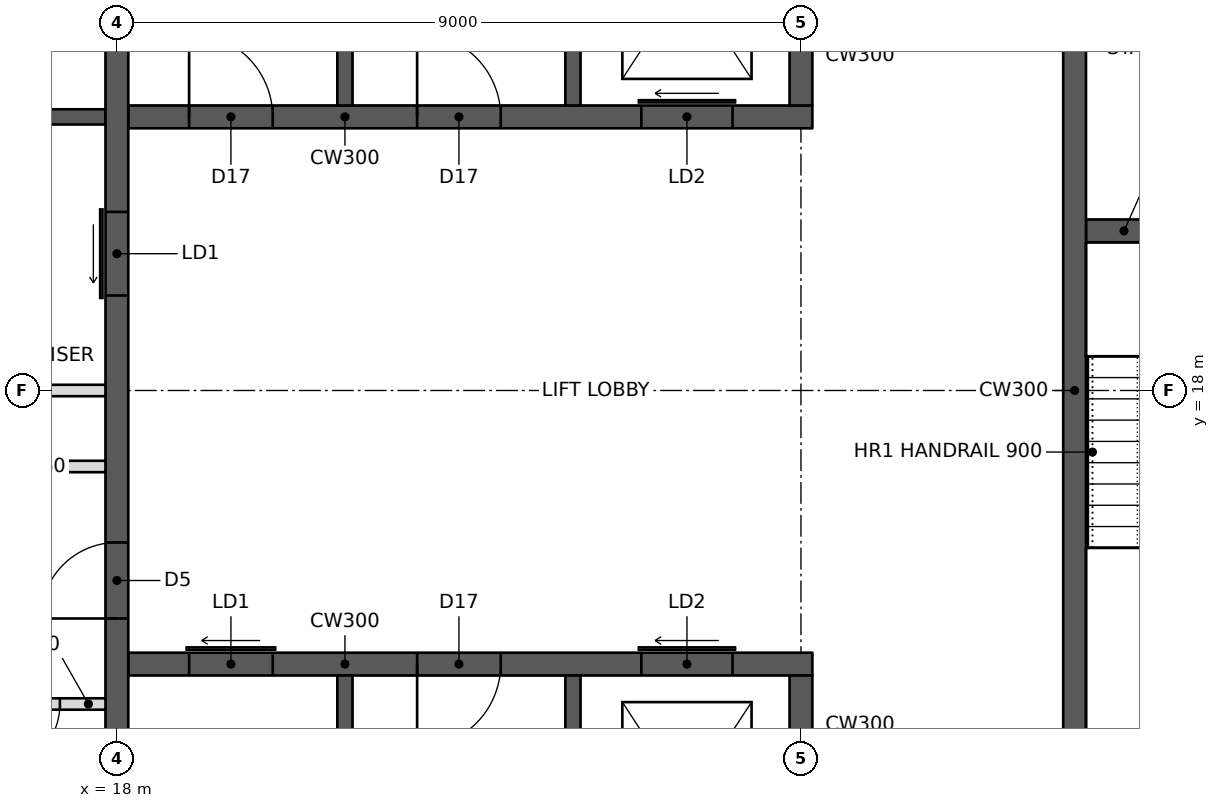
"""IFC4 building model, lengths in metres.
Left out: names, types, materials, properties, quantities, classifications, styles, units other than length and angle.
Written with IfcOpenShell. Run it as: python <this file> out.ifc"""

import sys

from ifc_helpers import new_model, si_unit, direction, frame, frame_2d, origin, place, context, subcontext, project, spatial, rectangle, extrude, element, fill, save


model = new_model("IFC4")
c1 = context("Model", 3, precision=1e-05, world=origin(), true_north=direction((0.0, 1.0)))
c2 = subcontext(c1, "Body", "Model", "MODEL_VIEW")
j1 = project(units=[si_unit("LENGTHUNIT", "METRE"), si_unit("PLANEANGLEUNIT", "RADIAN")], contexts=[c1])
p1 = place(None, origin())
s1 = spatial("IfcSite", under=j1, at=p1, CompositionType="ELEMENT")
p2 = place(p1, origin())
s2 = spatial("IfcBuilding", under=s1, at=p2, CompositionType="ELEMENT")
p3 = place(p2, frame((0.0, 0.0, 204.6)))
s3 = spatial("IfcBuildingStorey", under=s2, at=p3, CompositionType="ELEMENT", Elevation=204.6)
p4 = place(p3, frame((18.0, 11.4, 0.0), z_axis=(0.0, 0.0, 1.0), x_axis=(0.0, 1.0, 0.0)))
e1 = element("IfcWall", 1, at=p4, inside=s3, PredefinedType="SHEAR", context=c2, shape_type="SweptSolid", body=[
    extrude(rectangle(XDim=13.2, YDim=0.3, at=frame_2d((6.6, 0.0))), origin(), (0.0, 0.0, 1.0), 3.4),
])
p5 = place(p4, frame((3.6, 0.0, 0.0)))
e2 = element("IfcOpeningElement", 2, at=p5, cuts=e1, PredefinedType="OPENING", context=c2, shape_type="SweptSolid", body=[
    extrude(rectangle(XDim=1.0, YDim=2.1, at=frame_2d((0.5, 1.05))), frame((0.0, 0.16, 0.0), z_axis=(0.0, -1.0, 0.0), x_axis=(1.0, 0.0, 0.0)), (0.0, 0.0, 1.0), 0.32),
])
p6 = place(p4, frame((7.85, 0.0, 0.0)))
e3 = element("IfcOpeningElement", 3, at=p6, cuts=e1, PredefinedType="OPENING", context=c2, shape_type="SweptSolid", body=[
    extrude(rectangle(XDim=1.1, YDim=2.1, at=frame_2d((0.55, 1.05))), frame((0.0, 0.16, 0.0), z_axis=(0.0, -1.0, 0.0), x_axis=(1.0, 0.0, 0.0)), (0.0, 0.0, 1.0), 0.32),
])
p7 = place(p3, frame((14.55, 18.0, 0.0), z_axis=(0.0, 0.0, 1.0), x_axis=(1.0, 0.0, 0.0)))
e4 = element("IfcWall", 4, at=p7, inside=s3, PredefinedType="PARTITIONING", context=c2, shape_type="SweptSolid", body=[
    extrude(rectangle(XDim=3.3, YDim=0.15, at=frame_2d((1.65, 0.0))), origin(), (0.0, 0.0, 1.0), 3.2),
])
p8 = place(p3, frame((18.15, 14.4, 0.0), z_axis=(0.0, 0.0, 1.0), x_axis=(1.0, 0.0, 0.0)))
e5 = element("IfcWall", 5, at=p8, inside=s3, PredefinedType="SHEAR", context=c2, shape_type="SweptSolid", body=[
    extrude(rectangle(XDim=9.0, YDim=0.3, at=frame_2d((4.5, 0.0))), origin(), (0.0, 0.0, 1.0), 3.4),
])
p9 = place(p8, frame((0.8, 0.0, 0.0)))
e6 = element("IfcOpeningElement", 6, at=p9, cuts=e5, PredefinedType="OPENING", context=c2, shape_type="SweptSolid", body=[
    extrude(rectangle(XDim=1.1, YDim=2.1, at=frame_2d((0.55, 1.05))), frame((0.0, 0.16, 0.0), z_axis=(0.0, -1.0, 0.0), x_axis=(1.0, 0.0, 0.0)), (0.0, 0.0, 1.0), 0.32),
])
p10 = place(p8, frame((6.75, 0.0, 0.0)))
e7 = element("IfcOpeningElement", 7, at=p10, cuts=e5, PredefinedType="OPENING", context=c2, shape_type="SweptSolid", body=[
    extrude(rectangle(XDim=1.2, YDim=2.1, at=frame_2d((0.6, 1.05))), frame((0.0, 0.16, 0.0), z_axis=(0.0, -1.0, 0.0), x_axis=(1.0, 0.0, 0.0)), (0.0, 0.0, 1.0), 0.32),
])
p11 = place(p8, frame((3.8, 0.0, 0.0)))
e8 = element("IfcOpeningElement", 8, at=p11, cuts=e5, PredefinedType="OPENING", context=c2, shape_type="SweptSolid", body=[
    extrude(rectangle(XDim=1.1, YDim=2.1, at=frame_2d((0.55, 1.05))), frame((0.0, 0.16, 0.0), z_axis=(0.0, -1.0, 0.0), x_axis=(1.0, 0.0, 0.0)), (0.0, 0.0, 1.0), 0.32),
])
p12 = place(p3, frame((27.0, 11.4, 0.0), z_axis=(0.0, 0.0, 1.0), x_axis=(0.0, 1.0, 0.0)))
e9 = element("IfcWall", 9, at=p12, inside=s3, PredefinedType="SHEAR", context=c2, shape_type="SweptSolid", body=[
    extrude(rectangle(XDim=2.85, YDim=0.3, at=frame_2d((1.425, 0.0))), origin(), (0.0, 0.0, 1.0), 3.4),
])
for number, where, z_axis, x_axis in (
    (10, (21.0, 11.4, 0.0), (0.0, 0.0, 1.0), (0.0, 1.0, 0.0)),
    (11, (24.0, 11.4, 0.0), (0.0, 0.0, 1.0), (0.0, 1.0, 0.0)),
):
    element("IfcWall", number, at=place(p3, frame(where, z_axis=z_axis, x_axis=x_axis)), inside=s3, PredefinedType="SHEAR", context=c2, shape_type="SweptSolid", body=[
        extrude(rectangle(XDim=2.85, YDim=0.2, at=frame_2d((1.425, 0.0))), origin(), (0.0, 0.0, 1.0), 3.4),
    ])
p13 = place(p3, frame((18.15, 21.6, 0.0), z_axis=(0.0, 0.0, 1.0), x_axis=(1.0, 0.0, 0.0)))
e12 = element("IfcWall", 12, at=p13, inside=s3, PredefinedType="SHEAR", context=c2, shape_type="SweptSolid", body=[
    extrude(rectangle(XDim=9.0, YDim=0.3, at=frame_2d((4.5, 0.0))), origin(), (0.0, 0.0, 1.0), 3.4),
])
p14 = place(p13, frame((6.75, 0.0, 0.0)))
e13 = element("IfcOpeningElement", 13, at=p14, cuts=e12, PredefinedType="OPENING", context=c2, shape_type="SweptSolid", body=[
    extrude(rectangle(XDim=1.2, YDim=2.1, at=frame_2d((0.6, 1.05))), frame((0.0, 0.16, 0.0), z_axis=(0.0, -1.0, 0.0), x_axis=(1.0, 0.0, 0.0)), (0.0, 0.0, 1.0), 0.32),
])
p15 = place(p13, frame((0.8, 0.0, 0.0)))
e14 = element("IfcOpeningElement", 14, at=p15, cuts=e12, PredefinedType="OPENING", context=c2, shape_type="SweptSolid", body=[
    extrude(rectangle(XDim=1.1, YDim=2.1, at=frame_2d((0.55, 1.05))), frame((0.0, 0.16, 0.0), z_axis=(0.0, -1.0, 0.0), x_axis=(1.0, 0.0, 0.0)), (0.0, 0.0, 1.0), 0.32),
])
p16 = place(p13, frame((3.8, 0.0, 0.0)))
e15 = element("IfcOpeningElement", 15, at=p16, cuts=e12, PredefinedType="OPENING", context=c2, shape_type="SweptSolid", body=[
    extrude(rectangle(XDim=1.1, YDim=2.1, at=frame_2d((0.55, 1.05))), frame((0.0, 0.16, 0.0), z_axis=(0.0, -1.0, 0.0), x_axis=(1.0, 0.0, 0.0)), (0.0, 0.0, 1.0), 0.32),
])
p17 = place(p3, frame((27.0, 21.75, 0.0), z_axis=(0.0, 0.0, 1.0), x_axis=(0.0, 1.0, 0.0)))
e16 = element("IfcWall", 16, at=p17, inside=s3, PredefinedType="SHEAR", context=c2, shape_type="SweptSolid", body=[
    extrude(rectangle(XDim=2.85, YDim=0.3, at=frame_2d((1.425, 0.0))), origin(), (0.0, 0.0, 1.0), 3.4),
])
for number, where, z_axis, x_axis in (
    (17, (21.0, 21.75, 0.0), (0.0, 0.0, 1.0), (0.0, 1.0, 0.0)),
    (18, (24.0, 21.75, 0.0), (0.0, 0.0, 1.0), (0.0, 1.0, 0.0)),
):
    element("IfcWall", number, at=place(p3, frame(where, z_axis=z_axis, x_axis=x_axis)), inside=s3, PredefinedType="SHEAR", context=c2, shape_type="SweptSolid", body=[
        extrude(rectangle(XDim=2.85, YDim=0.2, at=frame_2d((1.425, 0.0))), origin(), (0.0, 0.0, 1.0), 3.4),
    ])
p18 = place(p3, frame((30.6, 11.4, 0.0), z_axis=(0.0, 0.0, 1.0), x_axis=(0.0, 1.0, 0.0)))
e19 = element("IfcWall", 19, at=p18, inside=s3, PredefinedType="SHEAR", context=c2, shape_type="SweptSolid", body=[
    extrude(rectangle(XDim=13.2, YDim=0.3, at=frame_2d((6.6, 0.0))), origin(), (0.0, 0.0, 1.0), 3.4),
])
p19 = place(p3, frame((30.75, 20.1, 0.0), z_axis=(0.0, 0.0, 1.0), x_axis=(1.0, 0.0, 0.0)))
e20 = element("IfcWall", 20, at=p19, inside=s3, PredefinedType="SHEAR", context=c2, shape_type="SweptSolid", body=[
    extrude(rectangle(XDim=2.85, YDim=0.3, at=frame_2d((1.425, 0.0))), origin(), (0.0, 0.0, 1.0), 3.4),
])
p20 = place(p19, frame((1.15, 0.0, 0.0)))
e21 = element("IfcOpeningElement", 21, at=p20, cuts=e20, PredefinedType="OPENING", context=c2, shape_type="SweptSolid", body=[
    extrude(rectangle(XDim=1.0, YDim=2.1, at=frame_2d((0.5, 1.05))), frame((0.0, 0.16, 0.0), z_axis=(0.0, -1.0, 0.0), x_axis=(1.0, 0.0, 0.0)), (0.0, 0.0, 1.0), 0.32),
])
p21 = place(p3, frame((14.55, 21.6, 0.0), z_axis=(0.0, 0.0, 1.0), x_axis=(1.0, 0.0, 0.0)))
e22 = element("IfcWall", 22, at=p21, inside=s3, PredefinedType="SHEAR", context=c2, shape_type="SweptSolid", body=[
    extrude(rectangle(XDim=3.3, YDim=0.2, at=frame_2d((1.65, 0.0))), origin(), (0.0, 0.0, 1.0), 3.4),
])
p22 = place(p3, frame((14.55, 17.0, 0.0), z_axis=(0.0, 0.0, 1.0), x_axis=(1.0, 0.0, 0.0)))
e23 = element("IfcWall", 23, at=p22, inside=s3, PredefinedType="PARTITIONING", context=c2, shape_type="SweptSolid", body=[
    extrude(rectangle(XDim=3.3, YDim=0.15, at=frame_2d((1.65, 0.0))), origin(), (0.0, 0.0, 1.0), 3.2),
])
p23 = place(p22, frame((0.3, 0.0, 0.0)))
e24 = element("IfcOpeningElement", 24, at=p23, cuts=e23, PredefinedType="OPENING", context=c2, shape_type="SweptSolid", body=[
    extrude(rectangle(XDim=1.0, YDim=2.1, at=frame_2d((0.5, 1.05))), frame((0.0, 0.085, 0.0), z_axis=(0.0, -1.0, 0.0), x_axis=(1.0, 0.0, 0.0)), (0.0, 0.0, 1.0), 0.17),
])
p24 = place(p3, frame((14.55, 13.875, 0.0), z_axis=(0.0, 0.0, 1.0), x_axis=(1.0, 0.0, 0.0)))
e25 = element("IfcWall", 25, at=p24, inside=s3, PredefinedType="PARTITIONING", context=c2, shape_type="SweptSolid", body=[
    extrude(rectangle(XDim=3.3, YDim=0.15, at=frame_2d((1.65, 0.0))), origin(), (0.0, 0.0, 1.0), 3.2),
])
p25 = place(p24, frame((0.2, 0.0, 0.0)))
e26 = element("IfcOpeningElement", 26, at=p25, cuts=e25, PredefinedType="OPENING", context=c2, shape_type="SweptSolid", body=[
    extrude(rectangle(XDim=0.9, YDim=2.1, at=frame_2d((0.45, 1.05))), frame((0.0, 0.085, 0.0), z_axis=(0.0, -1.0, 0.0), x_axis=(1.0, 0.0, 0.0)), (0.0, 0.0, 1.0), 0.17),
])
p26 = place(p24, frame((1.8, 0.0, 0.0)))
e27 = element("IfcOpeningElement", 27, at=p26, cuts=e25, PredefinedType="OPENING", context=c2, shape_type="SweptSolid", body=[
    extrude(rectangle(XDim=0.9, YDim=2.1, at=frame_2d((0.45, 1.05))), frame((0.0, 0.085, 0.0), z_axis=(0.0, -1.0, 0.0), x_axis=(1.0, 0.0, 0.0)), (0.0, 0.0, 1.0), 0.17),
])
p27 = place(p26, frame((0.9, 0.0, 0.0), z_axis=(0.0, 0.0, 1.0), x_axis=(-1.0, 0.0, 0.0)))
e28 = element("IfcDoor", 28, at=p27, inside=s3, OperationType="SINGLE_SWING_RIGHT", PredefinedType="DOOR", context=c2, shape_type="SweptSolid", body=[
    extrude(rectangle(XDim=0.9, YDim=2.1, at=frame_2d((0.45, 1.05))), frame((0.0, 0.025, 0.0), z_axis=(0.0, -1.0, 0.0), x_axis=(1.0, 0.0, 0.0)), (0.0, 0.0, 1.0), 0.05),
])
fill(e27, e28)
p28 = place(p5, origin())
e29 = element("IfcDoor", 29, at=p28, inside=s3, OperationType="SINGLE_SWING_LEFT", PredefinedType="DOOR", context=c2, shape_type="SweptSolid", body=[
    extrude(rectangle(XDim=1.0, YDim=2.1, at=frame_2d((0.5, 1.05))), frame((0.0, 0.025, 0.0), z_axis=(0.0, -1.0, 0.0), x_axis=(1.0, 0.0, 0.0)), (0.0, 0.0, 1.0), 0.05),
])
fill(e2, e29)
p29 = place(p9, origin())
e30 = element("IfcDoor", 30, at=p29, inside=s3, OperationType="SLIDING_TO_LEFT", PredefinedType="DOOR", context=c2, shape_type="SweptSolid", body=[
    extrude(rectangle(XDim=1.1, YDim=2.1, at=frame_2d((0.55, 1.05))), frame((0.0, 0.025, 0.0), z_axis=(0.0, -1.0, 0.0), x_axis=(1.0, 0.0, 0.0)), (0.0, 0.0, 1.0), 0.05),
])
fill(e6, e30)
p30 = place(p6, origin())
e31 = element("IfcDoor", 31, at=p30, inside=s3, OperationType="SLIDING_TO_LEFT", PredefinedType="DOOR", context=c2, shape_type="SweptSolid", body=[
    extrude(rectangle(XDim=1.1, YDim=2.1, at=frame_2d((0.55, 1.05))), frame((0.0, 0.025, 0.0), z_axis=(0.0, -1.0, 0.0), x_axis=(1.0, 0.0, 0.0)), (0.0, 0.0, 1.0), 0.05),
])
fill(e3, e31)
p31 = place(p10, origin())
e32 = element("IfcDoor", 32, at=p31, inside=s3, OperationType="SLIDING_TO_LEFT", PredefinedType="DOOR", context=c2, shape_type="SweptSolid", body=[
    extrude(rectangle(XDim=1.2, YDim=2.1, at=frame_2d((0.6, 1.05))), frame((0.0, 0.025, 0.0), z_axis=(0.0, -1.0, 0.0), x_axis=(1.0, 0.0, 0.0)), (0.0, 0.0, 1.0), 0.05),
])
fill(e7, e32)
p32 = place(p14, origin())
e33 = element("IfcDoor", 33, at=p32, inside=s3, OperationType="SLIDING_TO_LEFT", PredefinedType="DOOR", context=c2, shape_type="SweptSolid", body=[
    extrude(rectangle(XDim=1.2, YDim=2.1, at=frame_2d((0.6, 1.05))), frame((0.0, 0.025, 0.0), z_axis=(0.0, -1.0, 0.0), x_axis=(1.0, 0.0, 0.0)), (0.0, 0.0, 1.0), 0.05),
])
fill(e13, e33)
p33 = place(p15, origin())
e34 = element("IfcDoor", 34, at=p33, inside=s3, OperationType="SINGLE_SWING_LEFT", PredefinedType="DOOR", context=c2, shape_type="SweptSolid", body=[
    extrude(rectangle(XDim=1.1, YDim=2.1, at=frame_2d((0.55, 1.05))), frame((0.0, 0.025, 0.0), z_axis=(0.0, -1.0, 0.0), x_axis=(1.0, 0.0, 0.0)), (0.0, 0.0, 1.0), 0.05),
])
fill(e14, e34)
p34 = place(p16, origin())
e35 = element("IfcDoor", 35, at=p34, inside=s3, OperationType="SINGLE_SWING_LEFT", PredefinedType="DOOR", context=c2, shape_type="SweptSolid", body=[
    extrude(rectangle(XDim=1.1, YDim=2.1, at=frame_2d((0.55, 1.05))), frame((0.0, 0.025, 0.0), z_axis=(0.0, -1.0, 0.0), x_axis=(1.0, 0.0, 0.0)), (0.0, 0.0, 1.0), 0.05),
])
fill(e15, e35)
p35 = place(p11, frame((1.1, 0.0, 0.0), z_axis=(0.0, 0.0, 1.0), x_axis=(-1.0, 0.0, 0.0)))
e36 = element("IfcDoor", 36, at=p35, inside=s3, OperationType="SINGLE_SWING_RIGHT", PredefinedType="DOOR", context=c2, shape_type="SweptSolid", body=[
    extrude(rectangle(XDim=1.1, YDim=2.1, at=frame_2d((0.55, 1.05))), frame((0.0, 0.025, 0.0), z_axis=(0.0, -1.0, 0.0), x_axis=(1.0, 0.0, 0.0)), (0.0, 0.0, 1.0), 0.05),
])
fill(e8, e36)
save(model, sys.argv[1])
